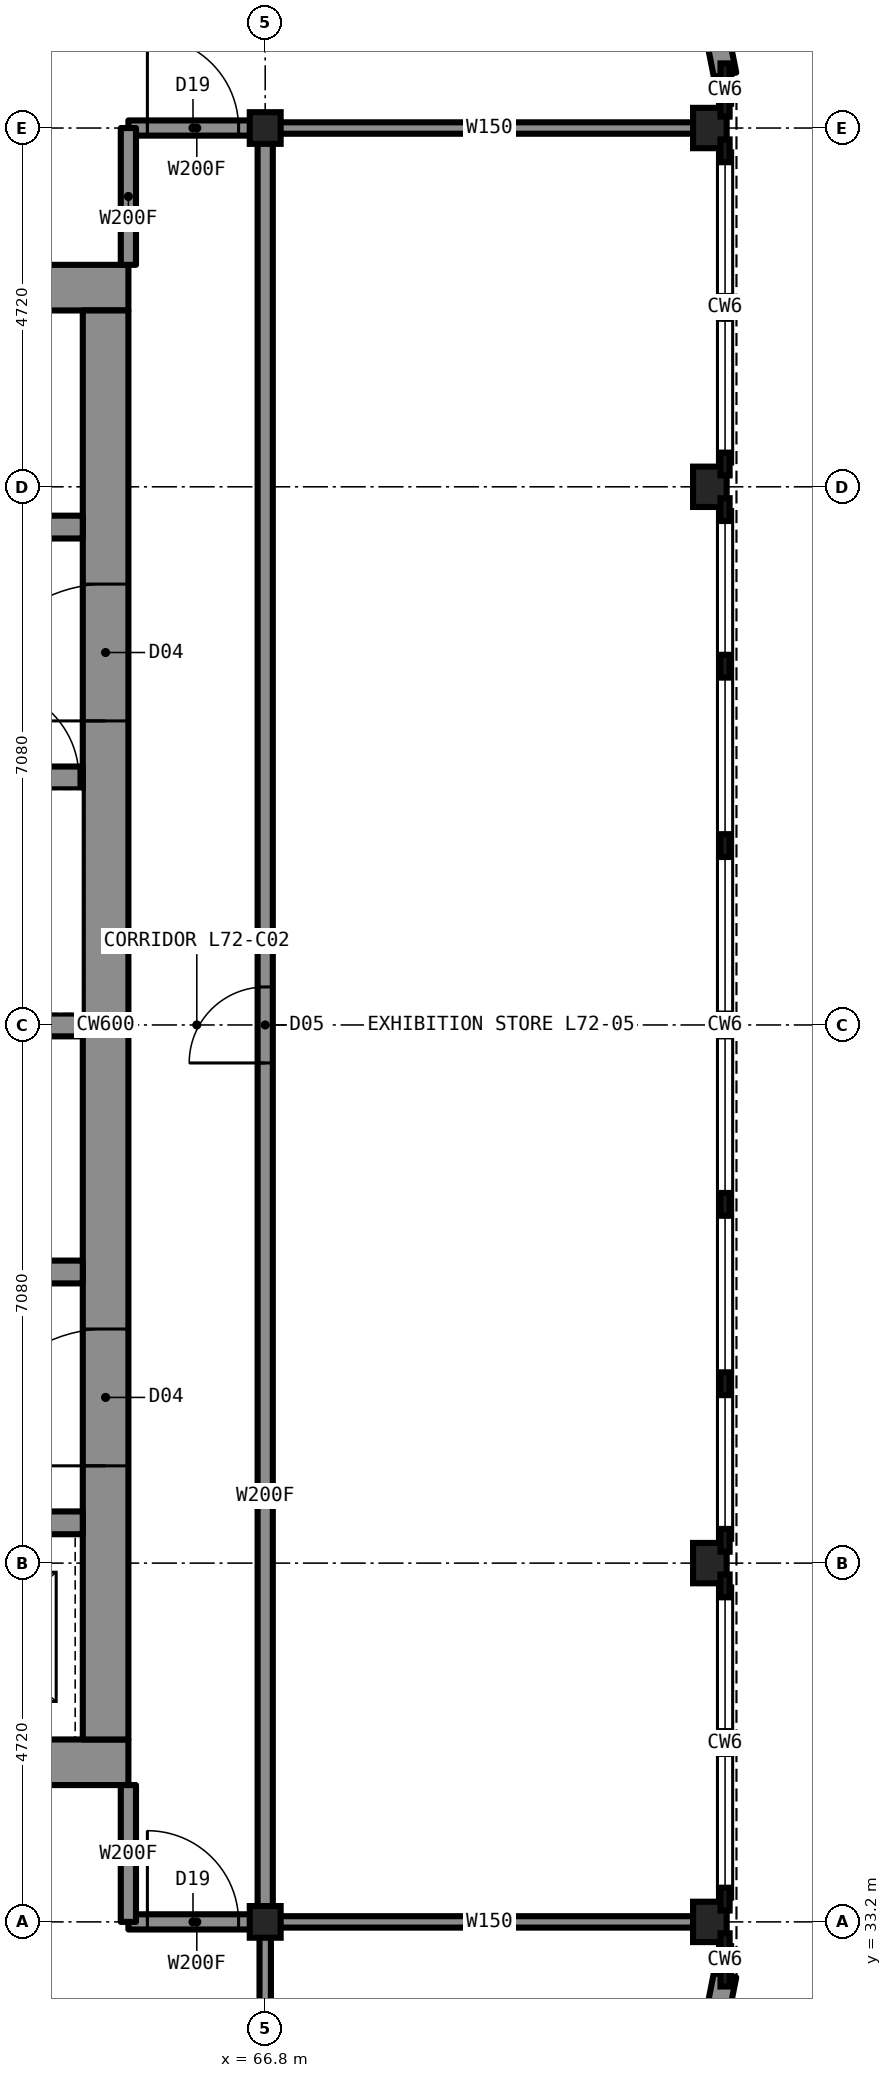
"""IFC4 building model, lengths in metres.
Left out: names, types, materials, properties, quantities, classifications, styles, units other than length and angle.
Written with IfcOpenShell. Run it as: python <this file> out.ifc"""

import sys

from ifc_helpers import new_model, si_unit, direction, frame, frame_2d, origin, origin_2d, place, context, subcontext, project, spatial, rectangle, i_section, extrude, element, fill, save


model = new_model("IFC4")
c1 = context("Model", 3, precision=1e-05, world=origin(), true_north=direction((0.0, 1.0)))
c2 = subcontext(c1, "Body", "Model", "MODEL_VIEW")
j1 = project(units=[si_unit("LENGTHUNIT", "METRE"), si_unit("PLANEANGLEUNIT", "RADIAN")], contexts=[c1])
p1 = place(None, origin())
s1 = spatial("IfcSite", under=j1, at=p1, CompositionType="ELEMENT")
p2 = place(p1, origin())
s2 = spatial("IfcBuilding", under=s1, at=p2, CompositionType="ELEMENT")
p3 = place(p2, frame((0.0, 0.0, 266.7)))
s3 = spatial("IfcBuildingStorey", under=s2, at=p3, CompositionType="ELEMENT", Elevation=266.7)
for number, where, z_axis, x_axis in (
    (1, (72.65, 33.2, 0.0), (0.0, 0.0, 1.0), (1.0, 0.0, 0.0)),
    (2, (72.65, 37.92, 0.0), (0.0, 0.0, 1.0), (1.0, 0.0, 0.0)),
    (3, (72.65, 52.08, 0.0), (0.0, 0.0, 1.0), (1.0, 0.0, 0.0)),
    (4, (72.65, 56.8, 0.0), (0.0, 0.0, 1.0), (1.0, 0.0, 0.0)),
):
    element("IfcColumn", number, at=place(p3, frame(where, z_axis=z_axis, x_axis=x_axis)), inside=s3, PredefinedType="COLUMN", context=c2, shape_type="SweptSolid", body=[
        extrude(i_section(OverallWidth=0.442, OverallDepth=0.531, WebThickness=0.066, FlangeThickness=0.106, at=origin_2d()), origin(), (0.0, 0.0, 1.0), 5.5),
    ])
for number, where, z_axis, x_axis in (
    (5, (66.8, 33.2, 0.0), (0.0, 0.0, 1.0), (1.0, 0.0, 0.0)),
    (6, (66.8, 56.8, 0.0), (0.0, 0.0, 1.0), (1.0, 0.0, 0.0)),
):
    element("IfcColumn", number, at=place(p3, frame(where, z_axis=z_axis, x_axis=x_axis)), inside=s3, PredefinedType="COLUMN", context=c2, shape_type="SweptSolid", body=[
        extrude(i_section(OverallWidth=0.406, OverallDepth=0.417, WebThickness=0.03, FlangeThickness=0.048, at=origin_2d()), origin(), (0.0, 0.0, 1.0), 5.5),
    ])
for number, where, z_axis, x_axis in (
    (7, (45.0, 54.7, 0.0), (0.0, 0.0, 1.0), (1.0, 0.0, 0.0)),
    (8, (45.0, 35.3, 0.0), (0.0, 0.0, 1.0), (1.0, 0.0, 0.0)),
):
    element("IfcWall", number, at=place(p3, frame(where, z_axis=z_axis, x_axis=x_axis)), inside=s3, PredefinedType="SHEAR", context=c2, shape_type="SweptSolid", body=[
        extrude(rectangle(XDim=20.0, YDim=0.6, at=frame_2d((10.0, 0.0))), origin(), (0.0, 0.0, 1.0), 5.5),
    ])
p4 = place(p3, frame((64.7, 35.6, 0.0), z_axis=(0.0, 0.0, 1.0), x_axis=(0.0, 1.0, 0.0)))
e9 = element("IfcWall", 9, at=p4, inside=s3, PredefinedType="SHEAR", context=c2, shape_type="SweptSolid", body=[
    extrude(rectangle(XDim=18.8, YDim=0.6, at=frame_2d((9.4, 0.0))), origin(), (0.0, 0.0, 1.0), 5.5),
])
p5 = place(p4, frame((13.4, 0.0, 0.0)))
e10 = element("IfcOpeningElement", 10, at=p5, cuts=e9, PredefinedType="OPENING", context=c2, shape_type="SweptSolid", body=[
    extrude(rectangle(XDim=1.8, YDim=2.2, at=frame_2d((0.9, 1.1))), frame((0.0, 0.31, 0.0), z_axis=(0.0, -1.0, 0.0), x_axis=(1.0, 0.0, 0.0)), (0.0, 0.0, 1.0), 0.62),
])
p6 = place(p4, frame((3.6, 0.0, 0.0)))
e11 = element("IfcOpeningElement", 11, at=p6, cuts=e9, PredefinedType="OPENING", context=c2, shape_type="SweptSolid", body=[
    extrude(rectangle(XDim=1.8, YDim=2.2, at=frame_2d((0.9, 1.1))), frame((0.0, 0.31, 0.0), z_axis=(0.0, -1.0, 0.0), x_axis=(1.0, 0.0, 0.0)), (0.0, 0.0, 1.0), 0.62),
])
p7 = place(p3, frame((45.6, 51.55, 0.0), z_axis=(0.0, 0.0, 1.0), x_axis=(1.0, 0.0, 0.0)))
e12 = element("IfcWall", 12, at=p7, inside=s3, PredefinedType="SHEAR", context=c2, shape_type="SweptSolid", body=[
    extrude(rectangle(XDim=18.8, YDim=0.3, at=frame_2d((9.4, 0.0))), origin(), (0.0, 0.0, 1.0), 5.5),
])
p8 = place(p7, frame((4.8, 0.0, 0.0)))
e13 = element("IfcOpeningElement", 13, at=p8, cuts=e12, PredefinedType="OPENING", context=c2, shape_type="SweptSolid", body=[
    extrude(rectangle(XDim=1.0, YDim=2.1, at=frame_2d((0.5, 1.05))), frame((0.0, 0.16, 0.0), z_axis=(0.0, -1.0, 0.0), x_axis=(1.0, 0.0, 0.0)), (0.0, 0.0, 1.0), 0.32),
])
p9 = place(p7, frame((11.6, 0.0, 0.0)))
e14 = element("IfcOpeningElement", 14, at=p9, cuts=e12, PredefinedType="OPENING", context=c2, shape_type="SweptSolid", body=[
    extrude(rectangle(XDim=1.1, YDim=2.2, at=frame_2d((0.55, 1.1))), frame((0.0, 0.16, 0.0), z_axis=(0.0, -1.0, 0.0), x_axis=(1.0, 0.0, 0.0)), (0.0, 0.0, 1.0), 0.32),
])
p10 = place(p7, frame((14.3, 0.0, 0.0)))
e15 = element("IfcOpeningElement", 15, at=p10, cuts=e12, PredefinedType="OPENING", context=c2, shape_type="SweptSolid", body=[
    extrude(rectangle(XDim=1.1, YDim=2.2, at=frame_2d((0.55, 1.1))), frame((0.0, 0.16, 0.0), z_axis=(0.0, -1.0, 0.0), x_axis=(1.0, 0.0, 0.0)), (0.0, 0.0, 1.0), 0.32),
])
p11 = place(p3, frame((45.6, 38.45, 0.0), z_axis=(0.0, 0.0, 1.0), x_axis=(1.0, 0.0, 0.0)))
e16 = element("IfcWall", 16, at=p11, inside=s3, PredefinedType="SHEAR", context=c2, shape_type="SweptSolid", body=[
    extrude(rectangle(XDim=18.8, YDim=0.3, at=frame_2d((9.4, 0.0))), origin(), (0.0, 0.0, 1.0), 5.5),
])
p12 = place(p11, frame((4.8, 0.0, 0.0)))
e17 = element("IfcOpeningElement", 17, at=p12, cuts=e16, PredefinedType="OPENING", context=c2, shape_type="SweptSolid", body=[
    extrude(rectangle(XDim=1.0, YDim=2.1, at=frame_2d((0.5, 1.05))), frame((0.0, 0.16, 0.0), z_axis=(0.0, -1.0, 0.0), x_axis=(1.0, 0.0, 0.0)), (0.0, 0.0, 1.0), 0.32),
])
p13 = place(p11, frame((11.5, 0.0, 0.0)))
e18 = element("IfcOpeningElement", 18, at=p13, cuts=e16, PredefinedType="OPENING", context=c2, shape_type="SweptSolid", body=[
    extrude(rectangle(XDim=1.1, YDim=2.2, at=frame_2d((0.55, 1.1))), frame((0.0, 0.16, 0.0), z_axis=(0.0, -1.0, 0.0), x_axis=(1.0, 0.0, 0.0)), (0.0, 0.0, 1.0), 0.32),
])
p14 = place(p11, frame((14.2, 0.0, 0.0)))
e19 = element("IfcOpeningElement", 19, at=p14, cuts=e16, PredefinedType="OPENING", context=c2, shape_type="SweptSolid", body=[
    extrude(rectangle(XDim=1.1, YDim=2.2, at=frame_2d((0.55, 1.1))), frame((0.0, 0.16, 0.0), z_axis=(0.0, -1.0, 0.0), x_axis=(1.0, 0.0, 0.0)), (0.0, 0.0, 1.0), 0.32),
])
p15 = place(p11, frame((16.9, 0.0, 0.0)))
e20 = element("IfcOpeningElement", 20, at=p15, cuts=e16, PredefinedType="OPENING", context=c2, shape_type="SweptSolid", body=[
    extrude(rectangle(XDim=1.1, YDim=2.2, at=frame_2d((0.55, 1.1))), frame((0.0, 0.16, 0.0), z_axis=(0.0, -1.0, 0.0), x_axis=(1.0, 0.0, 0.0)), (0.0, 0.0, 1.0), 0.32),
])
p16 = place(p3, frame((56.2, 48.25, 0.0), z_axis=(0.0, 0.0, 1.0), x_axis=(1.0, 0.0, 0.0)))
e21 = element("IfcWall", 21, at=p16, inside=s3, PredefinedType="SHEAR", context=c2, shape_type="SweptSolid", body=[
    extrude(rectangle(XDim=8.2, YDim=0.3, at=frame_2d((4.1, 0.0))), origin(), (0.0, 0.0, 1.0), 5.5),
])
p17 = place(p16, frame((6.95, 0.0, 0.0)))
e22 = element("IfcOpeningElement", 22, at=p17, cuts=e21, PredefinedType="OPENING", context=c2, shape_type="SweptSolid", body=[
    extrude(rectangle(XDim=1.2, YDim=2.2, at=frame_2d((0.6, 1.1))), frame((0.0, 0.16, 0.0), z_axis=(0.0, -1.0, 0.0), x_axis=(1.0, 0.0, 0.0)), (0.0, 0.0, 1.0), 0.32),
])
p18 = place(p3, frame((56.2, 41.75, 0.0), z_axis=(0.0, 0.0, 1.0), x_axis=(1.0, 0.0, 0.0)))
e23 = element("IfcWall", 23, at=p18, inside=s3, PredefinedType="SHEAR", context=c2, shape_type="SweptSolid", body=[
    extrude(rectangle(XDim=8.2, YDim=0.3, at=frame_2d((4.1, 0.0))), origin(), (0.0, 0.0, 1.0), 5.5),
])
p19 = place(p18, frame((3.3, 0.0, 0.0)))
e24 = element("IfcOpeningElement", 24, at=p19, cuts=e23, PredefinedType="OPENING", context=c2, shape_type="SweptSolid", body=[
    extrude(rectangle(XDim=1.0, YDim=2.1, at=frame_2d((0.5, 1.05))), frame((0.0, 0.16, 0.0), z_axis=(0.0, -1.0, 0.0), x_axis=(1.0, 0.0, 0.0)), (0.0, 0.0, 1.0), 0.32),
])
p20 = place(p3, frame((56.5, 45.0, 0.0), z_axis=(0.0, 0.0, 1.0), x_axis=(1.0, 0.0, 0.0)))
e25 = element("IfcWall", 25, at=p20, inside=s3, PredefinedType="SHEAR", context=c2, shape_type="SweptSolid", body=[
    extrude(rectangle(XDim=7.9, YDim=0.3, at=frame_2d((3.95, 0.0))), origin(), (0.0, 0.0, 1.0), 5.5),
])
p21 = place(p3, frame((65.0, 33.2, 0.0), z_axis=(0.0, 0.0, 1.0), x_axis=(1.0, 0.0, 0.0)))
e26 = element("IfcWall", 26, at=p21, inside=s3, PredefinedType="PARTITIONING", context=c2, shape_type="SweptSolid", body=[
    extrude(rectangle(XDim=1.8, YDim=0.2, at=frame_2d((0.9, 0.0))), origin(), (0.0, 0.0, 1.0), 5.28),
])
p22 = place(p21, frame((0.25, 0.0, 0.0)))
e27 = element("IfcOpeningElement", 27, at=p22, cuts=e26, PredefinedType="OPENING", context=c2, shape_type="SweptSolid", body=[
    extrude(rectangle(XDim=1.2, YDim=2.2, at=frame_2d((0.6, 1.1))), frame((0.0, 0.11, 0.0), z_axis=(0.0, -1.0, 0.0), x_axis=(1.0, 0.0, 0.0)), (0.0, 0.0, 1.0), 0.22),
])
p23 = place(p3, frame((66.8, 33.2, 0.0), z_axis=(0.0, 0.0, 1.0), x_axis=(1.0, 0.0, 0.0)))
e28 = element("IfcWall", 28, at=p23, inside=s3, PredefinedType="PARTITIONING", context=c2, shape_type="SweptSolid", body=[
    extrude(rectangle(XDim=5.9, YDim=0.15, at=frame_2d((2.95, 0.0))), origin(), (0.0, 0.0, 1.0), 4.368),
])
p24 = place(p3, frame((65.0, 56.8, 0.0), z_axis=(0.0, 0.0, 1.0), x_axis=(1.0, 0.0, 0.0)))
e29 = element("IfcWall", 29, at=p24, inside=s3, PredefinedType="PARTITIONING", context=c2, shape_type="SweptSolid", body=[
    extrude(rectangle(XDim=1.8, YDim=0.2, at=frame_2d((0.9, 0.0))), origin(), (0.0, 0.0, 1.0), 5.28),
])
p25 = place(p24, frame((0.25, 0.0, 0.0)))
e30 = element("IfcOpeningElement", 30, at=p25, cuts=e29, PredefinedType="OPENING", context=c2, shape_type="SweptSolid", body=[
    extrude(rectangle(XDim=1.2, YDim=2.2, at=frame_2d((0.6, 1.1))), frame((0.0, 0.11, 0.0), z_axis=(0.0, -1.0, 0.0), x_axis=(1.0, 0.0, 0.0)), (0.0, 0.0, 1.0), 0.22),
])
p26 = place(p3, frame((66.8, 56.8, 0.0), z_axis=(0.0, 0.0, 1.0), x_axis=(1.0, 0.0, 0.0)))
e31 = element("IfcWall", 31, at=p26, inside=s3, PredefinedType="PARTITIONING", context=c2, shape_type="SweptSolid", body=[
    extrude(rectangle(XDim=5.9, YDim=0.15, at=frame_2d((2.95, 0.0))), origin(), (0.0, 0.0, 1.0), 4.368),
])
for number, where, z_axis, x_axis in (
    (32, (65.0, 33.2, 0.0), (0.0, 0.0, 1.0), (0.0, 1.0, 0.0)),
    (33, (65.0, 55.0, 0.0), (0.0, 0.0, 1.0), (0.0, 1.0, 0.0)),
):
    element("IfcWall", number, at=place(p3, frame(where, z_axis=z_axis, x_axis=x_axis)), inside=s3, PredefinedType="PARTITIONING", context=c2, shape_type="SweptSolid", body=[
        extrude(rectangle(XDim=1.8, YDim=0.2, at=frame_2d((0.9, 0.0))), origin(), (0.0, 0.0, 1.0), 5.28),
    ])
p27 = place(p3, frame((66.8, 33.2, 0.0), z_axis=(0.0, 0.0, 1.0), x_axis=(0.0, 1.0, 0.0)))
e34 = element("IfcWall", 34, at=p27, inside=s3, PredefinedType="PARTITIONING", context=c2, shape_type="SweptSolid", body=[
    extrude(rectangle(XDim=23.6, YDim=0.2, at=frame_2d((11.8, 0.0))), origin(), (0.0, 0.0, 1.0), 5.28),
])
p28 = place(p27, frame((11.3, 0.0, 0.0)))
e35 = element("IfcOpeningElement", 35, at=p28, cuts=e34, PredefinedType="OPENING", context=c2, shape_type="SweptSolid", body=[
    extrude(rectangle(XDim=1.0, YDim=2.1, at=frame_2d((0.5, 1.05))), frame((0.0, 0.11, 0.0), z_axis=(0.0, -1.0, 0.0), x_axis=(1.0, 0.0, 0.0)), (0.0, 0.0, 1.0), 0.22),
])
p29 = place(p3, frame((66.8, 27.3, 0.0), z_axis=(0.0, 0.0, 1.0), x_axis=(0.0, 1.0, 0.0)))
e36 = element("IfcWall", 36, at=p29, inside=s3, PredefinedType="PARTITIONING", context=c2, shape_type="SweptSolid", body=[
    extrude(rectangle(XDim=5.9, YDim=0.15, at=frame_2d((2.95, 0.0))), origin(), (0.0, 0.0, 1.0), 4.368),
])
p30 = place(p29, frame((2.1, 0.0, 0.0)))
e37 = element("IfcOpeningElement", 37, at=p30, cuts=e36, PredefinedType="OPENING", context=c2, shape_type="SweptSolid", body=[
    extrude(rectangle(XDim=1.2, YDim=2.2, at=frame_2d((0.6, 1.1))), frame((0.0, 0.085, 0.0), z_axis=(0.0, -1.0, 0.0), x_axis=(1.0, 0.0, 0.0)), (0.0, 0.0, 1.0), 0.17),
])
for number, where, z_axis, x_axis in (
    (38, (72.443, 30.453, 0.0), (0.0, 0.0, 1.0), (0.195, 0.981, 0.0)),
    (39, (72.85, 57.5, 0.0), (0.0, 0.0, 1.0), (-0.195, 0.981, 0.0)),
):
    element("IfcWall", number, at=place(p3, frame(where, z_axis=z_axis, x_axis=x_axis)), inside=s3, PredefinedType="SOLIDWALL", context=c2, shape_type="SweptSolid", body=[
        extrude(rectangle(XDim=2.087, YDim=0.3, at=frame_2d((1.044, 0.0))), origin(), (0.0, 0.0, 1.0), 5.28),
    ])
p31 = place(p25, origin())
e40 = element("IfcDoor", 40, at=p31, inside=s3, OperationType="SINGLE_SWING_LEFT", PredefinedType="DOOR", context=c2, shape_type="SweptSolid", body=[
    extrude(rectangle(XDim=1.2, YDim=2.2, at=frame_2d((0.6, 1.1))), frame((0.0, 0.025, 0.0), z_axis=(0.0, -1.0, 0.0), x_axis=(1.0, 0.0, 0.0)), (0.0, 0.0, 1.0), 0.05),
])
fill(e30, e40)
p32 = place(p22, origin())
e41 = element("IfcDoor", 41, at=p32, inside=s3, OperationType="SINGLE_SWING_LEFT", PredefinedType="DOOR", context=c2, shape_type="SweptSolid", body=[
    extrude(rectangle(XDim=1.2, YDim=2.2, at=frame_2d((0.6, 1.1))), frame((0.0, 0.025, 0.0), z_axis=(0.0, -1.0, 0.0), x_axis=(1.0, 0.0, 0.0)), (0.0, 0.0, 1.0), 0.05),
])
fill(e27, e41)
p33 = place(p28, origin())
e42 = element("IfcDoor", 42, at=p33, inside=s3, OperationType="SINGLE_SWING_LEFT", PredefinedType="DOOR", context=c2, shape_type="SweptSolid", body=[
    extrude(rectangle(XDim=1.0, YDim=2.1, at=frame_2d((0.5, 1.05))), frame((0.0, 0.025, 0.0), z_axis=(0.0, -1.0, 0.0), x_axis=(1.0, 0.0, 0.0)), (0.0, 0.0, 1.0), 0.05),
])
fill(e35, e42)
p34 = place(p5, origin())
e43 = element("IfcDoor", 43, at=p34, inside=s3, OperationType="DOUBLE_DOOR_SINGLE_SWING", PredefinedType="DOOR", context=c2, shape_type="SweptSolid", body=[
    extrude(rectangle(XDim=1.8, YDim=2.2, at=frame_2d((0.9, 1.1))), frame((0.0, 0.025, 0.0), z_axis=(0.0, -1.0, 0.0), x_axis=(1.0, 0.0, 0.0)), (0.0, 0.0, 1.0), 0.05),
])
fill(e10, e43)
p35 = place(p6, origin())
e44 = element("IfcDoor", 44, at=p35, inside=s3, OperationType="DOUBLE_DOOR_SINGLE_SWING", PredefinedType="DOOR", context=c2, shape_type="SweptSolid", body=[
    extrude(rectangle(XDim=1.8, YDim=2.2, at=frame_2d((0.9, 1.1))), frame((0.0, 0.025, 0.0), z_axis=(0.0, -1.0, 0.0), x_axis=(1.0, 0.0, 0.0)), (0.0, 0.0, 1.0), 0.05),
])
fill(e11, e44)
p36 = place(p17, origin())
e45 = element("IfcDoor", 45, at=p36, inside=s3, OperationType="SINGLE_SWING_LEFT", PredefinedType="DOOR", context=c2, shape_type="SweptSolid", body=[
    extrude(rectangle(XDim=1.2, YDim=2.2, at=frame_2d((0.6, 1.1))), frame((0.0, 0.025, 0.0), z_axis=(0.0, -1.0, 0.0), x_axis=(1.0, 0.0, 0.0)), (0.0, 0.0, 1.0), 0.05),
])
fill(e22, e45)
save(model, sys.argv[1])
